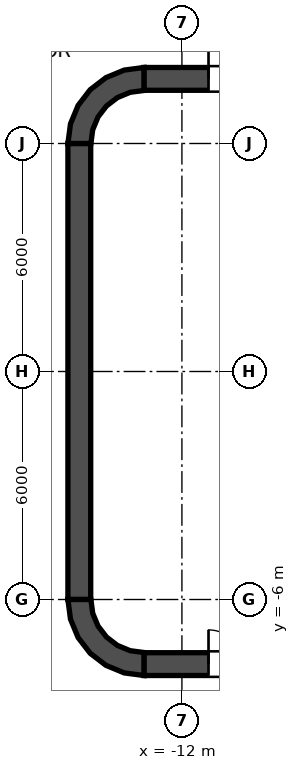
"""IFC4 building model, lengths in metres.
Left out: names, types, materials, properties, quantities, classifications, styles, units other than length and angle.
Written with IfcOpenShell. Run it as: python <this file> out.ifc"""

import sys

from ifc_helpers import new_model, si_unit, direction, frame, frame_2d, origin, place, context, subcontext, project, spatial, polyline, rectangle, outline, extrude, element, fill, save


model = new_model("IFC4")
c1 = context("Model", 3, precision=1e-05, world=origin(), true_north=direction((0.0, 1.0)))
c2 = subcontext(c1, "Body", "Model", "MODEL_VIEW")
j1 = project(units=[si_unit("LENGTHUNIT", "METRE"), si_unit("PLANEANGLEUNIT", "RADIAN")], contexts=[c1])
p1 = place(None, origin())
s1 = spatial("IfcSite", under=j1, at=p1, CompositionType="ELEMENT")
p2 = place(p1, origin())
s2 = spatial("IfcBuilding", under=s1, at=p2, CompositionType="ELEMENT")
p3 = place(p2, frame((0.0, 0.0, 127.2)))
s3 = spatial("IfcBuildingStorey", under=s2, at=p3, CompositionType="ELEMENT", Elevation=127.2)
p4 = place(p3, frame((-13.0, 7.7, 0.0), z_axis=(0.0, 0.0, 1.0), x_axis=(1.0, 0.0, 0.0)))
e1 = element("IfcWall", 1, at=p4, inside=s3, PredefinedType="SHEAR", context=c2, shape_type="SweptSolid", body=[
    extrude(rectangle(XDim=26.0, YDim=0.6, at=frame_2d((13.0, 0.0))), origin(), (0.0, 0.0, 1.0), 4.2),
])
p5 = place(p4, frame((1.7, 0.0, 0.0)))
e2 = element("IfcOpeningElement", 2, at=p5, cuts=e1, PredefinedType="OPENING", context=c2, shape_type="SweptSolid", body=[
    extrude(rectangle(XDim=1.8, YDim=2.1, at=frame_2d((0.9, 1.05))), frame((0.0, 0.3, 0.0), z_axis=(0.0, -1.0, 0.0), x_axis=(1.0, 0.0, 0.0)), (0.0, 0.0, 1.0), 0.6),
])
p6 = place(p4, frame((22.5, 0.0, 0.0)))
e3 = element("IfcOpeningElement", 3, at=p6, cuts=e1, PredefinedType="OPENING", context=c2, shape_type="SweptSolid", body=[
    extrude(rectangle(XDim=1.8, YDim=2.1, at=frame_2d((0.9, 1.05))), frame((0.0, 0.3, 0.0), z_axis=(0.0, -1.0, 0.0), x_axis=(1.0, 0.0, 0.0)), (0.0, 0.0, 1.0), 0.6),
])
p7 = place(p3, frame((-13.0, -7.7, 0.0), z_axis=(0.0, 0.0, 1.0), x_axis=(1.0, 0.0, 0.0)))
e4 = element("IfcWall", 4, at=p7, inside=s3, PredefinedType="SHEAR", context=c2, shape_type="SweptSolid", body=[
    extrude(rectangle(XDim=26.0, YDim=0.6, at=frame_2d((13.0, 0.0))), origin(), (0.0, 0.0, 1.0), 4.2),
])
p8 = place(p7, frame((1.7, 0.0, 0.0)))
e5 = element("IfcOpeningElement", 5, at=p8, cuts=e4, PredefinedType="OPENING", context=c2, shape_type="SweptSolid", body=[
    extrude(rectangle(XDim=1.8, YDim=2.1, at=frame_2d((0.9, 1.05))), frame((0.0, 0.3, 0.0), z_axis=(0.0, -1.0, 0.0), x_axis=(1.0, 0.0, 0.0)), (0.0, 0.0, 1.0), 0.6),
])
p9 = place(p7, frame((22.5, 0.0, 0.0)))
e6 = element("IfcOpeningElement", 6, at=p9, cuts=e4, PredefinedType="OPENING", context=c2, shape_type="SweptSolid", body=[
    extrude(rectangle(XDim=1.8, YDim=2.1, at=frame_2d((0.9, 1.05))), frame((0.0, 0.3, 0.0), z_axis=(0.0, -1.0, 0.0), x_axis=(1.0, 0.0, 0.0)), (0.0, 0.0, 1.0), 0.6),
])
p10 = place(p3, frame((-14.7, -6.0, 0.0), z_axis=(0.0, 0.0, 1.0), x_axis=(0.0, 1.0, 0.0)))
e7 = element("IfcWall", 7, at=p10, inside=s3, PredefinedType="SHEAR", context=c2, shape_type="SweptSolid", body=[
    extrude(rectangle(XDim=12.0, YDim=0.6, at=frame_2d((6.0, 0.0))), origin(), (0.0, 0.0, 1.0), 4.2),
])
p11 = place(p3, origin())
e8 = element("IfcWall", 8, at=p11, inside=s3, PredefinedType="SHEAR", context=c2, shape_type="SweptSolid", body=[
    extrude(outline(polyline([(-15.0, 6.0), (-14.395, 6.0), (-14.347, 6.361), (-14.208, 6.698), (-13.986, 6.986), (-13.698, 7.208), (-13.361, 7.347), (-13.0, 7.395), (-13.0, 8.0), (-13.518, 7.932), (-14.0, 7.732), (-14.414, 7.414), (-14.732, 7.0), (-14.932, 6.518), (-15.0, 6.0)])), origin(), (0.0, 0.0, 1.0), 4.2),
])
e9 = element("IfcWall", 9, at=p11, inside=s3, PredefinedType="SHEAR", context=c2, shape_type="SweptSolid", body=[
    extrude(outline(polyline([(-13.0, -8.0), (-13.0, -7.395), (-13.361, -7.347), (-13.698, -7.208), (-13.986, -6.986), (-14.208, -6.698), (-14.347, -6.361), (-14.395, -6.0), (-15.0, -6.0), (-14.932, -6.518), (-14.732, -7.0), (-14.414, -7.414), (-14.0, -7.732), (-13.518, -7.932), (-13.0, -8.0)])), origin(), (0.0, 0.0, 1.0), 4.2),
])
p12 = place(p3, frame((-11.8, -7.4, 0.0), z_axis=(0.0, 0.0, 1.0), x_axis=(0.0, 1.0, 0.0)))
e10 = element("IfcWall", 10, at=p12, inside=s3, PredefinedType="SOLIDWALL", context=c2, shape_type="SweptSolid", body=[
    extrude(rectangle(XDim=14.8, YDim=0.4, at=frame_2d((7.4, 0.0))), origin(), (0.0, 0.0, 1.0), 4.05),
])
p13 = place(p12, frame((11.2, 0.0, 0.0)))
e11 = element("IfcOpeningElement", 11, at=p13, cuts=e10, PredefinedType="OPENING", context=c2, shape_type="SweptSolid", body=[
    extrude(rectangle(XDim=1.1, YDim=2.1, at=frame_2d((0.55, 1.05))), frame((0.0, 0.2, 0.0), z_axis=(0.0, -1.0, 0.0), x_axis=(1.0, 0.0, 0.0)), (0.0, 0.0, 1.0), 0.4),
])
p14 = place(p12, frame((8.3, 0.0, 0.0)))
e12 = element("IfcOpeningElement", 12, at=p14, cuts=e10, PredefinedType="OPENING", context=c2, shape_type="SweptSolid", body=[
    extrude(rectangle(XDim=1.1, YDim=2.1, at=frame_2d((0.55, 1.05))), frame((0.0, 0.2, 0.0), z_axis=(0.0, -1.0, 0.0), x_axis=(1.0, 0.0, 0.0)), (0.0, 0.0, 1.0), 0.4),
])
p15 = place(p12, frame((5.4, 0.0, 0.0)))
e13 = element("IfcOpeningElement", 13, at=p15, cuts=e10, PredefinedType="OPENING", context=c2, shape_type="SweptSolid", body=[
    extrude(rectangle(XDim=1.1, YDim=2.1, at=frame_2d((0.55, 1.05))), frame((0.0, 0.2, 0.0), z_axis=(0.0, -1.0, 0.0), x_axis=(1.0, 0.0, 0.0)), (0.0, 0.0, 1.0), 0.4),
])
p16 = place(p12, frame((13.552, 0.0, 0.0)))
e14 = element("IfcOpeningElement", 14, at=p16, cuts=e10, PredefinedType="OPENING", context=c2, shape_type="SweptSolid", body=[
    extrude(rectangle(XDim=0.9, YDim=2.1, at=frame_2d((0.45, 1.05))), frame((0.0, 0.2, 0.0), z_axis=(0.0, -1.0, 0.0), x_axis=(1.0, 0.0, 0.0)), (0.0, 0.0, 1.0), 0.4),
])
p17 = place(p12, frame((0.347, 0.0, 0.0)))
e15 = element("IfcOpeningElement", 15, at=p17, cuts=e10, PredefinedType="OPENING", context=c2, shape_type="SweptSolid", body=[
    extrude(rectangle(XDim=0.9, YDim=2.1, at=frame_2d((0.45, 1.05))), frame((0.0, 0.2, 0.0), z_axis=(0.0, -1.0, 0.0), x_axis=(1.0, 0.0, 0.0)), (0.0, 0.0, 1.0), 0.4),
])
e16 = element("IfcWall", 16, at=p11, inside=s3, PredefinedType="SOLIDWALL", context=c2, shape_type="SweptSolid", body=[
    extrude(outline(polyline([(-12.0, -5.925), (-12.0, -5.675), (-14.15, -5.675), (-14.15, -3.025), (-12.0, -3.025), (-12.0, -2.775), (-14.15, -2.775), (-14.15, -0.125), (-12.0, -0.125), (-12.0, 0.125), (-14.15, 0.125), (-14.15, 2.775), (-12.0, 2.775), (-12.0, 3.025), (-14.15, 3.025), (-14.15, 5.675), (-12.0, 5.675), (-12.0, 5.925), (-14.15, 5.925), (-14.4, 5.925), (-14.4, 5.675), (-14.4, 3.025), (-14.4, 2.775), (-14.4, 0.125), (-14.4, -0.125), (-14.4, -2.775), (-14.4, -3.025), (-14.4, -5.675), (-14.4, -5.925), (-14.15, -5.925), (-12.0, -5.925)])), origin(), (0.0, 0.0, 1.0), 4.05),
])
p18 = place(p13, origin())
e17 = element("IfcDoor", 17, at=p18, inside=s3, OperationType="DOUBLE_DOOR_SLIDING", PredefinedType="DOOR", context=c2, shape_type="SweptSolid", body=[
    extrude(rectangle(XDim=1.1, YDim=2.1, at=frame_2d((0.55, 1.05))), frame((0.0, 0.025, 0.0), z_axis=(0.0, -1.0, 0.0), x_axis=(1.0, 0.0, 0.0)), (0.0, 0.0, 1.0), 0.05),
])
fill(e11, e17)
p19 = place(p14, origin())
e18 = element("IfcDoor", 18, at=p19, inside=s3, OperationType="DOUBLE_DOOR_SLIDING", PredefinedType="DOOR", context=c2, shape_type="SweptSolid", body=[
    extrude(rectangle(XDim=1.1, YDim=2.1, at=frame_2d((0.55, 1.05))), frame((0.0, 0.025, 0.0), z_axis=(0.0, -1.0, 0.0), x_axis=(1.0, 0.0, 0.0)), (0.0, 0.0, 1.0), 0.05),
])
fill(e12, e18)
p20 = place(p15, origin())
e19 = element("IfcDoor", 19, at=p20, inside=s3, OperationType="DOUBLE_DOOR_SLIDING", PredefinedType="DOOR", context=c2, shape_type="SweptSolid", body=[
    extrude(rectangle(XDim=1.1, YDim=2.1, at=frame_2d((0.55, 1.05))), frame((0.0, 0.025, 0.0), z_axis=(0.0, -1.0, 0.0), x_axis=(1.0, 0.0, 0.0)), (0.0, 0.0, 1.0), 0.05),
])
fill(e13, e19)
p21 = place(p16, origin())
e20 = element("IfcDoor", 20, at=p21, inside=s3, OperationType="SINGLE_SWING_LEFT", PredefinedType="DOOR", context=c2, shape_type="SweptSolid", body=[
    extrude(rectangle(XDim=0.9, YDim=2.1, at=frame_2d((0.45, 1.05))), frame((0.0, 0.025, 0.0), z_axis=(0.0, -1.0, 0.0), x_axis=(1.0, 0.0, 0.0)), (0.0, 0.0, 1.0), 0.05),
])
fill(e14, e20)
p22 = place(p17, origin())
e21 = element("IfcDoor", 21, at=p22, inside=s3, OperationType="SINGLE_SWING_LEFT", PredefinedType="DOOR", context=c2, shape_type="SweptSolid", body=[
    extrude(rectangle(XDim=0.9, YDim=2.1, at=frame_2d((0.45, 1.05))), frame((0.0, 0.025, 0.0), z_axis=(0.0, -1.0, 0.0), x_axis=(1.0, 0.0, 0.0)), (0.0, 0.0, 1.0), 0.05),
])
fill(e15, e21)
p23 = place(p5, origin())
e22 = element("IfcDoor", 22, at=p23, inside=s3, OperationType="DOUBLE_DOOR_SINGLE_SWING", PredefinedType="DOOR", context=c2, shape_type="SweptSolid", body=[
    extrude(rectangle(XDim=1.8, YDim=2.1, at=frame_2d((0.9, 1.05))), frame((0.0, 0.025, 0.0), z_axis=(0.0, -1.0, 0.0), x_axis=(1.0, 0.0, 0.0)), (0.0, 0.0, 1.0), 0.05),
])
fill(e2, e22)
p24 = place(p8, origin())
e23 = element("IfcDoor", 23, at=p24, inside=s3, OperationType="DOUBLE_DOOR_SINGLE_SWING", PredefinedType="DOOR", context=c2, shape_type="SweptSolid", body=[
    extrude(rectangle(XDim=1.8, YDim=2.1, at=frame_2d((0.9, 1.05))), frame((0.0, 0.025, 0.0), z_axis=(0.0, -1.0, 0.0), x_axis=(1.0, 0.0, 0.0)), (0.0, 0.0, 1.0), 0.05),
])
fill(e5, e23)
save(model, sys.argv[1])
